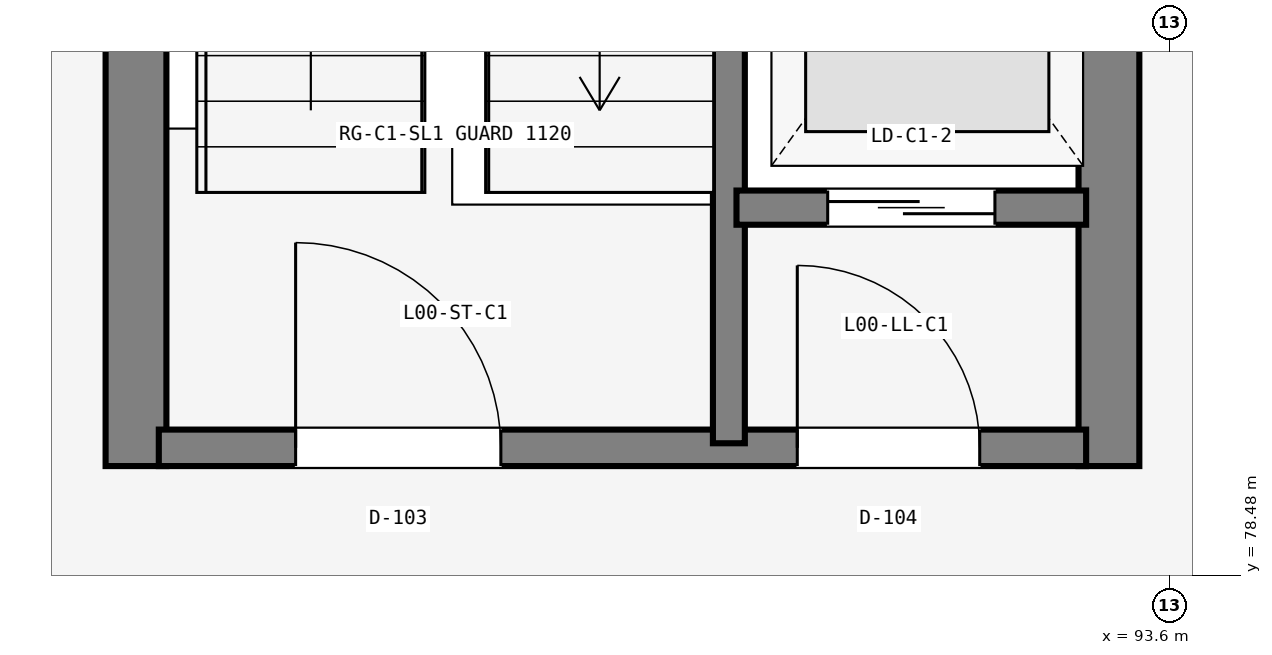
"""IFC4 building model, lengths in metres.
Left out: names, types, materials, properties, quantities, classifications, styles, units other than length and angle.
Written with IfcOpenShell. Run it as: python <this file> out.ifc"""

import sys

from ifc_helpers import new_model, si_unit, direction, frame, frame_2d, origin, place, context, subcontext, project, spatial, rectangle, extrude, element, fill, save


model = new_model("IFC4")
c1 = context("Model", 3, precision=1e-05, world=origin(), true_north=direction((0.0, 1.0)))
c2 = subcontext(c1, "Body", "Model", "MODEL_VIEW")
j1 = project(units=[si_unit("LENGTHUNIT", "METRE"), si_unit("PLANEANGLEUNIT", "RADIAN")], contexts=[c1])
p1 = place(None, origin())
s1 = spatial("IfcSite", under=j1, at=p1, CompositionType="ELEMENT")
p2 = place(p1, origin())
s2 = spatial("IfcBuilding", under=s1, at=p2, CompositionType="ELEMENT")
p3 = place(p2, origin())
s3 = spatial("IfcBuildingStorey", under=s2, at=p3, CompositionType="ELEMENT", Elevation=0.0)
for number, where, z_axis, x_axis in (
    (1, (86.8, 79.2, 0.0), (0.0, 0.0, 1.0), (0.0, 1.0, 0.0)),
    (2, (93.2, 79.2, 0.0), (0.0, 0.0, 1.0), (0.0, 1.0, 0.0)),
):
    element("IfcWall", number, at=place(p3, frame(where, z_axis=z_axis, x_axis=x_axis)), inside=s3, PredefinedType="SHEAR", context=c2, shape_type="SweptSolid", body=[
        extrude(rectangle(XDim=8.6, YDim=0.4, at=frame_2d((4.3, 0.0))), origin(), (0.0, 0.0, 1.0), 5.4),
    ])
p4 = place(p3, frame((86.95, 79.32, 0.0), z_axis=(0.0, 0.0, 1.0), x_axis=(1.0, 0.0, 0.0)))
e3 = element("IfcWall", 3, at=p4, inside=s3, PredefinedType="PARTITIONING", context=c2, shape_type="SweptSolid", body=[
    extrude(rectangle(XDim=6.1, YDim=0.24, at=frame_2d((3.05, 0.0))), origin(), (0.0, 0.0, 1.0), 4.46),
])
p5 = place(p4, frame((0.9, 0.0, 0.0)))
e4 = element("IfcOpeningElement", 4, at=p5, cuts=e3, PredefinedType="OPENING", context=c2, shape_type="SweptSolid", body=[
    extrude(rectangle(XDim=1.35, YDim=2.2, at=frame_2d((0.675, 1.1))), frame((0.0, 0.13, 0.0), z_axis=(0.0, -1.0, 0.0), x_axis=(1.0, 0.0, 0.0)), (0.0, 0.0, 1.0), 0.26),
])
p6 = place(p4, frame((4.2, 0.0, 0.0)))
e5 = element("IfcOpeningElement", 5, at=p6, cuts=e3, PredefinedType="OPENING", context=c2, shape_type="SweptSolid", body=[
    extrude(rectangle(XDim=1.2, YDim=2.2, at=frame_2d((0.6, 1.1))), frame((0.0, 0.13, 0.0), z_axis=(0.0, -1.0, 0.0), x_axis=(1.0, 0.0, 0.0)), (0.0, 0.0, 1.0), 0.26),
])
p7 = place(p3, frame((90.7, 79.35, 0.0), z_axis=(0.0, 0.0, 1.0), x_axis=(0.0, 1.0, 0.0)))
e6 = element("IfcWall", 6, at=p7, inside=s3, PredefinedType="PARTITIONING", context=c2, shape_type="SweptSolid", body=[
    extrude(rectangle(XDim=8.3, YDim=0.21, at=frame_2d((4.15, 0.0))), origin(), (0.0, 0.0, 1.0), 4.46),
])
p8 = place(p3, frame((90.75, 80.9, 0.0), z_axis=(0.0, 0.0, 1.0), x_axis=(1.0, 0.0, 0.0)))
e7 = element("IfcWall", 7, at=p8, inside=s3, PredefinedType="PARTITIONING", context=c2, shape_type="SweptSolid", body=[
    extrude(rectangle(XDim=2.3, YDim=0.225, at=frame_2d((1.15, 0.0))), origin(), (0.0, 0.0, 1.0), 4.46),
])
p9 = place(p8, frame((0.6, 0.0, 0.0)))
e8 = element("IfcOpeningElement", 8, at=p9, cuts=e7, PredefinedType="OPENING", context=c2, shape_type="SweptSolid", body=[
    extrude(rectangle(XDim=1.1, YDim=2.15, at=frame_2d((0.55, 1.075))), frame((0.0, 0.123, 0.0), z_axis=(0.0, -1.0, 0.0), x_axis=(1.0, 0.0, 0.0)), (0.0, 0.0, 1.0), 0.245),
])
p10 = place(p5, origin())
e9 = element("IfcDoor", 9, at=p10, inside=s3, OperationType="SINGLE_SWING_RIGHT", PredefinedType="DOOR", context=c2, shape_type="SweptSolid", body=[
    extrude(rectangle(XDim=1.35, YDim=2.2, at=frame_2d((0.675, 1.1))), frame((0.0, 0.025, 0.0), z_axis=(0.0, -1.0, 0.0), x_axis=(1.0, 0.0, 0.0)), (0.0, 0.0, 1.0), 0.05),
])
fill(e4, e9)
p11 = place(p6, origin())
e10 = element("IfcDoor", 10, at=p11, inside=s3, OperationType="SINGLE_SWING_LEFT", PredefinedType="DOOR", context=c2, shape_type="SweptSolid", body=[
    extrude(rectangle(XDim=1.2, YDim=2.2, at=frame_2d((0.6, 1.1))), frame((0.0, 0.025, 0.0), z_axis=(0.0, -1.0, 0.0), x_axis=(1.0, 0.0, 0.0)), (0.0, 0.0, 1.0), 0.05),
])
fill(e5, e10)
p12 = place(p9, origin())
e11 = element("IfcDoor", 11, at=p12, inside=s3, OperationType="SLIDING_TO_RIGHT", PredefinedType="DOOR", context=c2, shape_type="SweptSolid", body=[
    extrude(rectangle(XDim=1.1, YDim=2.15, at=frame_2d((0.55, 1.075))), frame((0.0, 0.025, 0.0), z_axis=(0.0, -1.0, 0.0), x_axis=(1.0, 0.0, 0.0)), (0.0, 0.0, 1.0), 0.05),
])
fill(e8, e11)
save(model, sys.argv[1])
